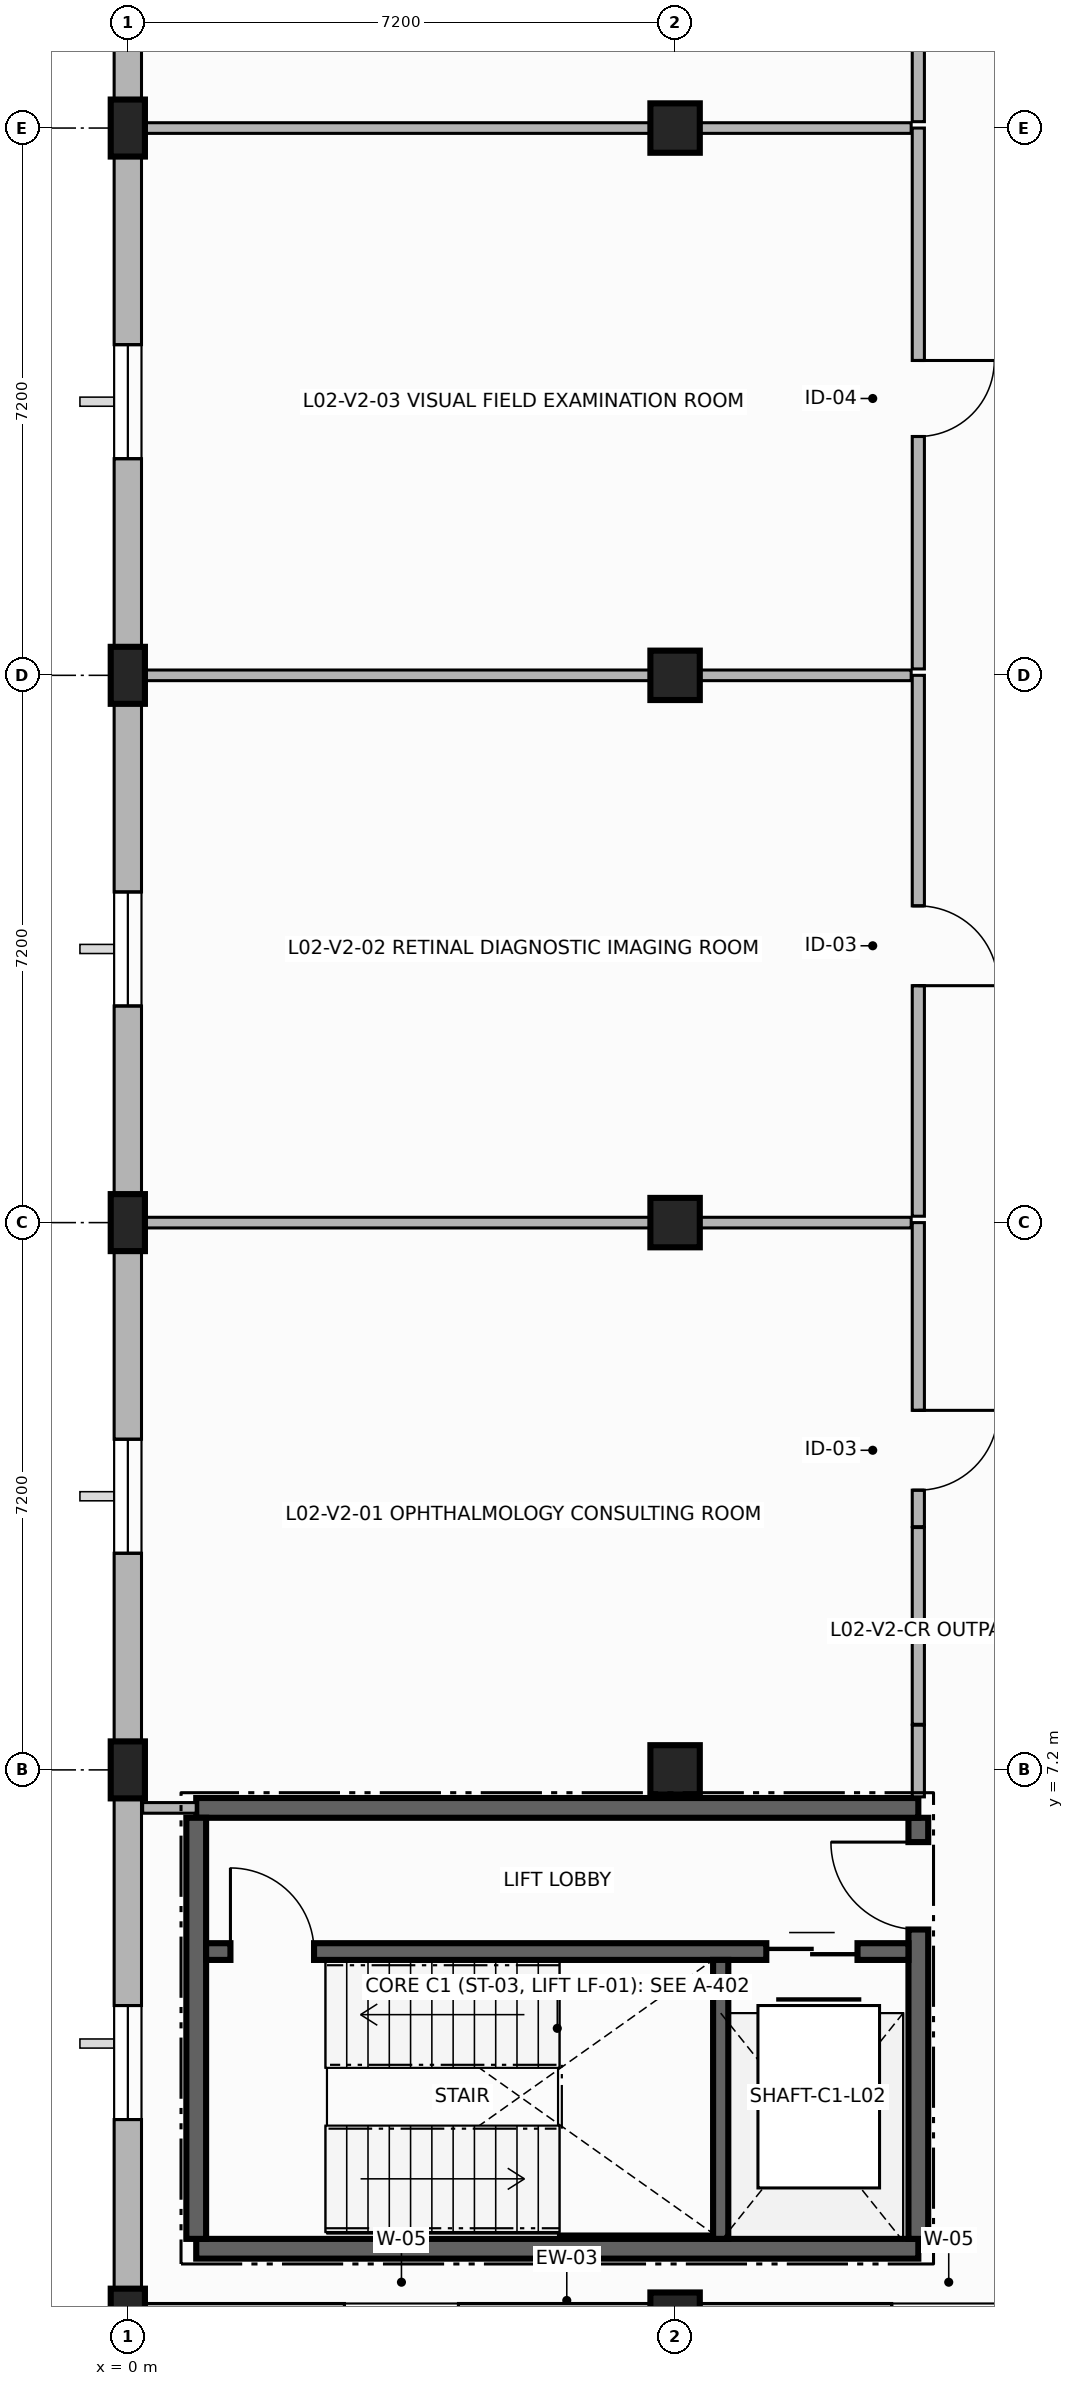
"""IFC4 building model, lengths in metres.
Left out: names, types, materials, properties, quantities, classifications, styles, units other than length and angle.
Written with IfcOpenShell. Run it as: python <this file> out.ifc"""

import sys

from ifc_helpers import new_model, si_unit, direction, frame, frame_2d, origin, origin_with_axes, origin_2d, place, context, subcontext, project, spatial, rectangle, extrude, element, fill, save


model = new_model("IFC4")
c1 = context("Model", 3, precision=1e-05, world=origin(), true_north=direction((0.0, 1.0)))
c2 = subcontext(c1, "Body", "Model", "MODEL_VIEW")
j1 = project(units=[si_unit("LENGTHUNIT", "METRE"), si_unit("PLANEANGLEUNIT", "RADIAN")], contexts=[c1])
p1 = place(None, origin())
s1 = spatial("IfcSite", under=j1, at=p1, CompositionType="ELEMENT")
p2 = place(p1, origin())
s2 = spatial("IfcBuilding", under=s1, at=p2, CompositionType="ELEMENT")
p3 = place(p2, frame((0.0, 0.0, 8.4)))
s3 = spatial("IfcBuildingStorey", under=s2, at=p3, CompositionType="ELEMENT", Elevation=8.4)
for number, where, z_axis, x_axis in (
    (1, (0.0, 0.0, 0.0), (0.0, 0.0, 1.0), (1.0, 0.0, 0.0)),
    (2, (0.0, 7.2, 0.0), (0.0, 0.0, 1.0), (1.0, 0.0, 0.0)),
    (3, (0.0, 14.4, 0.0), (0.0, 0.0, 1.0), (1.0, 0.0, 0.0)),
    (4, (0.0, 21.6, 0.0), (0.0, 0.0, 1.0), (1.0, 0.0, 0.0)),
    (5, (0.0, 28.8, 0.0), (0.0, 0.0, 1.0), (1.0, 0.0, 0.0)),
):
    element("IfcColumn", number, at=place(p3, frame(where, z_axis=z_axis, x_axis=x_axis)), inside=s3, PredefinedType="PILASTER", context=c2, shape_type="SweptSolid", body=[
        extrude(rectangle(XDim=0.45, YDim=0.75, at=origin_2d()), origin(), (0.0, 0.0, 1.0), 3.62),
    ])
for number, where, z_axis, x_axis in (
    (6, (7.2, 0.0, 0.0), (0.0, 0.0, 1.0), (1.0, 0.0, 0.0)),
    (7, (7.2, 7.2, 0.0), (0.0, 0.0, 1.0), (1.0, 0.0, 0.0)),
    (8, (7.2, 14.4, 0.0), (0.0, 0.0, 1.0), (1.0, 0.0, 0.0)),
    (9, (7.2, 21.6, 0.0), (0.0, 0.0, 1.0), (1.0, 0.0, 0.0)),
    (10, (7.2, 28.8, 0.0), (0.0, 0.0, 1.0), (1.0, 0.0, 0.0)),
):
    element("IfcColumn", number, at=place(p3, frame(where, z_axis=z_axis, x_axis=x_axis)), inside=s3, PredefinedType="COLUMN", context=c2, shape_type="SweptSolid", body=[
        extrude(rectangle(XDim=0.65, YDim=0.65, at=origin_2d()), origin(), (0.0, 0.0, 1.0), 3.62),
    ])
p4 = place(p3, origin_with_axes())
e11 = element("IfcWall", 11, at=p4, inside=s3, PredefinedType="SOLIDWALL", context=c2, shape_type="SweptSolid", body=[
    extrude(rectangle(XDim=7.2, YDim=0.36, at=frame_2d((3.6, 0.0))), origin(), (0.0, 0.0, 1.0), 3.0),
])
p5 = place(p4, frame((2.85, 0.0, 0.85)))
e12 = element("IfcOpeningElement", 12, at=p5, cuts=e11, PredefinedType="OPENING", context=c2, shape_type="SweptSolid", body=[
    extrude(rectangle(XDim=1.5, YDim=1.9, at=frame_2d((0.75, 0.95))), frame((0.0, 0.19, 0.0), z_axis=(0.0, -1.0, 0.0), x_axis=(1.0, 0.0, 0.0)), (0.0, 0.0, 1.0), 0.38),
])
p6 = place(p3, frame((7.2, 0.0, 0.0), z_axis=(0.0, 0.0, 1.0), x_axis=(1.0, 0.0, 0.0)))
e13 = element("IfcWall", 13, at=p6, inside=s3, PredefinedType="SOLIDWALL", context=c2, shape_type="SweptSolid", body=[
    extrude(rectangle(XDim=7.2, YDim=0.36, at=frame_2d((3.6, 0.0))), origin(), (0.0, 0.0, 1.0), 3.0),
])
p7 = place(p6, frame((2.85, 0.0, 0.85)))
e14 = element("IfcOpeningElement", 14, at=p7, cuts=e13, PredefinedType="OPENING", context=c2, shape_type="SweptSolid", body=[
    extrude(rectangle(XDim=1.5, YDim=1.9, at=frame_2d((0.75, 0.95))), frame((0.0, 0.19, 0.0), z_axis=(0.0, -1.0, 0.0), x_axis=(1.0, 0.0, 0.0)), (0.0, 0.0, 1.0), 0.38),
])
p8 = place(p3, frame((0.0, 36.0, 0.0), z_axis=(0.0, 0.0, 1.0), x_axis=(0.0, -1.0, 0.0)))
e15 = element("IfcWall", 15, at=p8, inside=s3, PredefinedType="SOLIDWALL", context=c2, shape_type="SweptSolid", body=[
    extrude(rectangle(XDim=7.2, YDim=0.36, at=frame_2d((3.6, 0.0))), origin(), (0.0, 0.0, 1.0), 3.0),
])
p9 = place(p8, frame((2.85, 0.0, 0.85)))
e16 = element("IfcOpeningElement", 16, at=p9, cuts=e15, PredefinedType="OPENING", context=c2, shape_type="SweptSolid", body=[
    extrude(rectangle(XDim=1.5, YDim=1.9, at=frame_2d((0.75, 0.95))), frame((0.0, 0.19, 0.0), z_axis=(0.0, -1.0, 0.0), x_axis=(1.0, 0.0, 0.0)), (0.0, 0.0, 1.0), 0.38),
])
p10 = place(p3, frame((0.0, 28.8, 0.0), z_axis=(0.0, 0.0, 1.0), x_axis=(0.0, -1.0, 0.0)))
e17 = element("IfcWall", 17, at=p10, inside=s3, PredefinedType="SOLIDWALL", context=c2, shape_type="SweptSolid", body=[
    extrude(rectangle(XDim=7.2, YDim=0.36, at=frame_2d((3.6, 0.0))), origin(), (0.0, 0.0, 1.0), 3.0),
])
p11 = place(p10, frame((2.85, 0.0, 0.85)))
e18 = element("IfcOpeningElement", 18, at=p11, cuts=e17, PredefinedType="OPENING", context=c2, shape_type="SweptSolid", body=[
    extrude(rectangle(XDim=1.5, YDim=1.9, at=frame_2d((0.75, 0.95))), frame((0.0, 0.19, 0.0), z_axis=(0.0, -1.0, 0.0), x_axis=(1.0, 0.0, 0.0)), (0.0, 0.0, 1.0), 0.38),
])
p12 = place(p3, frame((0.0, 21.6, 0.0), z_axis=(0.0, 0.0, 1.0), x_axis=(0.0, -1.0, 0.0)))
e19 = element("IfcWall", 19, at=p12, inside=s3, PredefinedType="SOLIDWALL", context=c2, shape_type="SweptSolid", body=[
    extrude(rectangle(XDim=7.2, YDim=0.36, at=frame_2d((3.6, 0.0))), origin(), (0.0, 0.0, 1.0), 3.0),
])
p13 = place(p12, frame((2.85, 0.0, 0.85)))
e20 = element("IfcOpeningElement", 20, at=p13, cuts=e19, PredefinedType="OPENING", context=c2, shape_type="SweptSolid", body=[
    extrude(rectangle(XDim=1.5, YDim=1.9, at=frame_2d((0.75, 0.95))), frame((0.0, 0.19, 0.0), z_axis=(0.0, -1.0, 0.0), x_axis=(1.0, 0.0, 0.0)), (0.0, 0.0, 1.0), 0.38),
])
p14 = place(p3, frame((0.0, 14.4, 0.0), z_axis=(0.0, 0.0, 1.0), x_axis=(0.0, -1.0, 0.0)))
e21 = element("IfcWall", 21, at=p14, inside=s3, PredefinedType="SOLIDWALL", context=c2, shape_type="SweptSolid", body=[
    extrude(rectangle(XDim=7.2, YDim=0.36, at=frame_2d((3.6, 0.0))), origin(), (0.0, 0.0, 1.0), 3.0),
])
p15 = place(p14, frame((2.85, 0.0, 0.85)))
e22 = element("IfcOpeningElement", 22, at=p15, cuts=e21, PredefinedType="OPENING", context=c2, shape_type="SweptSolid", body=[
    extrude(rectangle(XDim=1.5, YDim=1.9, at=frame_2d((0.75, 0.95))), frame((0.0, 0.19, 0.0), z_axis=(0.0, -1.0, 0.0), x_axis=(1.0, 0.0, 0.0)), (0.0, 0.0, 1.0), 0.38),
])
p16 = place(p3, frame((0.0, 7.2, 0.0), z_axis=(0.0, 0.0, 1.0), x_axis=(0.0, -1.0, 0.0)))
e23 = element("IfcWall", 23, at=p16, inside=s3, PredefinedType="SOLIDWALL", context=c2, shape_type="SweptSolid", body=[
    extrude(rectangle(XDim=7.2, YDim=0.36, at=frame_2d((3.6, 0.0))), origin(), (0.0, 0.0, 1.0), 3.0),
])
p17 = place(p16, frame((3.1, 0.0, 0.85)))
e24 = element("IfcOpeningElement", 24, at=p17, cuts=e23, PredefinedType="OPENING", context=c2, shape_type="SweptSolid", body=[
    extrude(rectangle(XDim=1.5, YDim=1.9, at=frame_2d((0.75, 0.95))), frame((0.0, 0.19, 0.0), z_axis=(0.0, -1.0, 0.0), x_axis=(1.0, 0.0, 0.0)), (0.0, 0.0, 1.0), 0.38),
])
p18 = place(p3, frame((0.9, 0.9, 0.0), z_axis=(0.0, 0.0, 1.0), x_axis=(1.0, 0.0, 0.0)))
e25 = element("IfcWall", 25, at=p18, inside=s3, PredefinedType="SHEAR", context=c2, shape_type="SweptSolid", body=[
    extrude(rectangle(XDim=9.5, YDim=0.26, at=frame_2d((4.75, 0.0))), origin(), (0.0, 0.0, 1.0), 3.62),
])
p19 = place(p3, frame((10.4, 1.03, 0.0), z_axis=(0.0, 0.0, 1.0), x_axis=(0.0, 1.0, 0.0)))
e26 = element("IfcWall", 26, at=p19, inside=s3, PredefinedType="SHEAR", context=c2, shape_type="SweptSolid", body=[
    extrude(rectangle(XDim=5.54, YDim=0.26, at=frame_2d((2.77, 0.0))), origin(), (0.0, 0.0, 1.0), 3.62),
])
p20 = place(p19, frame((4.07, 0.0, 0.0)))
e27 = element("IfcOpeningElement", 27, at=p20, cuts=e26, PredefinedType="OPENING", context=c2, shape_type="SweptSolid", body=[
    extrude(rectangle(XDim=1.15, YDim=2.2, at=frame_2d((0.575, 1.1))), frame((0.0, 0.14, 0.0), z_axis=(0.0, -1.0, 0.0), x_axis=(1.0, 0.0, 0.0)), (0.0, 0.0, 1.0), 0.28),
])
p21 = place(p3, frame((10.4, 6.7, 0.0), z_axis=(0.0, 0.0, 1.0), x_axis=(-1.0, 0.0, 0.0)))
e28 = element("IfcWall", 28, at=p21, inside=s3, PredefinedType="SHEAR", context=c2, shape_type="SweptSolid", body=[
    extrude(rectangle(XDim=9.5, YDim=0.26, at=frame_2d((4.75, 0.0))), origin(), (0.0, 0.0, 1.0), 3.62),
])
p22 = place(p3, frame((0.9, 6.57, 0.0), z_axis=(0.0, 0.0, 1.0), x_axis=(0.0, -1.0, 0.0)))
e29 = element("IfcWall", 29, at=p22, inside=s3, PredefinedType="SHEAR", context=c2, shape_type="SweptSolid", body=[
    extrude(rectangle(XDim=5.54, YDim=0.26, at=frame_2d((2.77, 0.0))), origin(), (0.0, 0.0, 1.0), 3.62),
])
p23 = place(p3, frame((1.03, 4.81, 0.0), z_axis=(0.0, 0.0, 1.0), x_axis=(1.0, 0.0, 0.0)))
e30 = element("IfcWall", 30, at=p23, inside=s3, PredefinedType="SHEAR", context=c2, shape_type="SweptSolid", body=[
    extrude(rectangle(XDim=9.24, YDim=0.22, at=frame_2d((4.62, 0.0))), origin(), (0.0, 0.0, 1.0), 3.62),
])
p24 = place(p23, frame((0.32, 0.0, 0.0)))
e31 = element("IfcOpeningElement", 31, at=p24, cuts=e30, PredefinedType="OPENING", context=c2, shape_type="SweptSolid", body=[
    extrude(rectangle(XDim=1.1, YDim=2.15, at=frame_2d((0.55, 1.075))), frame((0.0, 0.12, 0.0), z_axis=(0.0, -1.0, 0.0), x_axis=(1.0, 0.0, 0.0)), (0.0, 0.0, 1.0), 0.24),
])
p25 = place(p23, frame((7.37, 0.0, 0.0)))
e32 = element("IfcOpeningElement", 32, at=p25, cuts=e30, PredefinedType="OPENING", context=c2, shape_type="SweptSolid", body=[
    extrude(rectangle(XDim=1.2, YDim=2.2, at=frame_2d((0.6, 1.1))), frame((0.0, 0.12, 0.0), z_axis=(0.0, -1.0, 0.0), x_axis=(1.0, 0.0, 0.0)), (0.0, 0.0, 1.0), 0.24),
])
p26 = place(p3, frame((7.8, 1.03, 0.0), z_axis=(0.0, 0.0, 1.0), x_axis=(0.0, 1.0, 0.0)))
e33 = element("IfcWall", 33, at=p26, inside=s3, PredefinedType="SHEAR", context=c2, shape_type="SweptSolid", body=[
    extrude(rectangle(XDim=3.67, YDim=0.2, at=frame_2d((1.835, 0.0))), origin(), (0.0, 0.0, 1.0), 3.62),
])
p27 = place(p3, frame((10.4, 14.4, 0.0), z_axis=(0.0, 0.0, 1.0), x_axis=(0.0, -1.0, 0.0)))
e34 = element("IfcWall", 34, at=p27, inside=s3, PredefinedType="PARTITIONING", context=c2, shape_type="SweptSolid", body=[
    extrude(rectangle(XDim=4.0, YDim=0.16, at=frame_2d((2.0, 0.0))), origin(), (0.0, 0.0, 1.0), 2.98),
])
p28 = place(p27, frame((2.47, 0.0, 0.0)))
e35 = element("IfcOpeningElement", 35, at=p28, cuts=e34, PredefinedType="OPENING", context=c2, shape_type="SweptSolid", body=[
    extrude(rectangle(XDim=1.05, YDim=2.15, at=frame_2d((0.525, 1.075))), frame((0.0, 0.09, 0.0), z_axis=(0.0, -1.0, 0.0), x_axis=(1.0, 0.0, 0.0)), (0.0, 0.0, 1.0), 0.18),
])
p29 = place(p3, frame((10.4, 10.388, 0.0), z_axis=(0.0, 0.0, 1.0), x_axis=(0.0, -1.0, 0.0)))
e36 = element("IfcWall", 36, at=p29, inside=s3, PredefinedType="PARTITIONING", context=c2, shape_type="SweptSolid", body=[
    extrude(rectangle(XDim=2.588, YDim=0.16, at=frame_2d((1.294, 0.0))), origin(), (0.0, 0.0, 1.0), 2.98),
])
p30 = place(p3, frame((10.4, 7.788, 0.0), z_axis=(0.0, 0.0, 1.0), x_axis=(0.0, -1.0, 0.0)))
e37 = element("IfcWall", 37, at=p30, inside=s3, PredefinedType="PARTITIONING", context=c2, shape_type="SweptSolid", body=[
    extrude(rectangle(XDim=0.943, YDim=0.16, at=frame_2d((0.472, 0.0))), origin(), (0.0, 0.0, 1.0), 2.98),
])
p31 = place(p3, frame((0.9, 6.7, 0.0), z_axis=(0.0, 0.0, 1.0), x_axis=(-1.0, 0.0, 0.0)))
e38 = element("IfcWall", 38, at=p31, inside=s3, PredefinedType="PARTITIONING", context=c2, shape_type="SweptSolid", body=[
    extrude(rectangle(XDim=0.705, YDim=0.14, at=frame_2d((0.353, 0.0))), origin(), (0.0, 0.0, 1.0), 2.98),
])
p32 = place(p3, frame((0.195, 14.4, 0.0), z_axis=(0.0, 0.0, 1.0), x_axis=(1.0, 0.0, 0.0)))
e39 = element("IfcWall", 39, at=p32, inside=s3, PredefinedType="PARTITIONING", context=c2, shape_type="SweptSolid", body=[
    extrude(rectangle(XDim=10.111, YDim=0.14, at=frame_2d((5.055, 0.0))), origin(), (0.0, 0.0, 1.0), 2.98),
])
p33 = place(p3, frame((10.4, 21.6, 0.0), z_axis=(0.0, 0.0, 1.0), x_axis=(0.0, -1.0, 0.0)))
e40 = element("IfcWall", 40, at=p33, inside=s3, PredefinedType="PARTITIONING", context=c2, shape_type="SweptSolid", body=[
    extrude(rectangle(XDim=7.116, YDim=0.16, at=frame_2d((3.558, 0.0))), origin(), (0.0, 0.0, 1.0), 2.98),
])
p34 = place(p33, frame((3.033, 0.0, 0.0)))
e41 = element("IfcOpeningElement", 41, at=p34, cuts=e40, PredefinedType="OPENING", context=c2, shape_type="SweptSolid", body=[
    extrude(rectangle(XDim=1.05, YDim=2.15, at=frame_2d((0.525, 1.075))), frame((0.0, 0.09, 0.0), z_axis=(0.0, -1.0, 0.0), x_axis=(1.0, 0.0, 0.0)), (0.0, 0.0, 1.0), 0.18),
])
p35 = place(p3, frame((0.195, 21.6, 0.0), z_axis=(0.0, 0.0, 1.0), x_axis=(1.0, 0.0, 0.0)))
e42 = element("IfcWall", 42, at=p35, inside=s3, PredefinedType="PARTITIONING", context=c2, shape_type="SweptSolid", body=[
    extrude(rectangle(XDim=10.111, YDim=0.14, at=frame_2d((5.055, 0.0))), origin(), (0.0, 0.0, 1.0), 2.98),
])
p36 = place(p3, frame((10.4, 28.8, 0.0), z_axis=(0.0, 0.0, 1.0), x_axis=(0.0, -1.0, 0.0)))
e43 = element("IfcWall", 43, at=p36, inside=s3, PredefinedType="PARTITIONING", context=c2, shape_type="SweptSolid", body=[
    extrude(rectangle(XDim=7.116, YDim=0.16, at=frame_2d((3.558, 0.0))), origin(), (0.0, 0.0, 1.0), 2.98),
])
p37 = place(p36, frame((3.058, 0.0, 0.0)))
e44 = element("IfcOpeningElement", 44, at=p37, cuts=e43, PredefinedType="OPENING", context=c2, shape_type="SweptSolid", body=[
    extrude(rectangle(XDim=1.0, YDim=2.15, at=frame_2d((0.5, 1.075))), frame((0.0, 0.09, 0.0), z_axis=(0.0, -1.0, 0.0), x_axis=(1.0, 0.0, 0.0)), (0.0, 0.0, 1.0), 0.18),
])
p38 = place(p3, frame((0.195, 28.8, 0.0), z_axis=(0.0, 0.0, 1.0), x_axis=(1.0, 0.0, 0.0)))
e45 = element("IfcWall", 45, at=p38, inside=s3, PredefinedType="PARTITIONING", context=c2, shape_type="SweptSolid", body=[
    extrude(rectangle(XDim=10.111, YDim=0.14, at=frame_2d((5.055, 0.0))), origin(), (0.0, 0.0, 1.0), 2.98),
])
p39 = place(p3, frame((10.4, 36.655, 0.0), z_axis=(0.0, 0.0, 1.0), x_axis=(0.0, -1.0, 0.0)))
e46 = element("IfcWall", 46, at=p39, inside=s3, PredefinedType="PARTITIONING", context=c2, shape_type="SweptSolid", body=[
    extrude(rectangle(XDim=7.771, YDim=0.16, at=frame_2d((3.885, 0.0))), origin(), (0.0, 0.0, 1.0), 2.98),
])
p40 = place(p39, frame((3.538, 0.0, 0.0)))
e47 = element("IfcOpeningElement", 47, at=p40, cuts=e46, PredefinedType="OPENING", context=c2, shape_type="SweptSolid", body=[
    extrude(rectangle(XDim=1.4, YDim=2.3, at=frame_2d((0.7, 1.15))), frame((0.0, 0.09, 0.0), z_axis=(0.0, -1.0, 0.0), x_axis=(1.0, 0.0, 0.0)), (0.0, 0.0, 1.0), 0.18),
])
p41 = place(p11, origin())
e48 = element("IfcWindow", 48, at=p41, inside=s3, PartitioningType="SINGLE_PANEL", PredefinedType="WINDOW", context=c2, shape_type="SweptSolid", body=[
    extrude(rectangle(XDim=1.5, YDim=1.9, at=frame_2d((0.75, 0.95))), frame((0.0, 0.03, 0.0), z_axis=(0.0, -1.0, 0.0), x_axis=(1.0, 0.0, 0.0)), (0.0, 0.0, 1.0), 0.06),
])
fill(e18, e48)
p42 = place(p13, origin())
e49 = element("IfcWindow", 49, at=p42, inside=s3, PartitioningType="SINGLE_PANEL", PredefinedType="WINDOW", context=c2, shape_type="SweptSolid", body=[
    extrude(rectangle(XDim=1.5, YDim=1.9, at=frame_2d((0.75, 0.95))), frame((0.0, 0.03, 0.0), z_axis=(0.0, -1.0, 0.0), x_axis=(1.0, 0.0, 0.0)), (0.0, 0.0, 1.0), 0.06),
])
fill(e20, e49)
p43 = place(p15, origin())
e50 = element("IfcWindow", 50, at=p43, inside=s3, PartitioningType="SINGLE_PANEL", PredefinedType="WINDOW", context=c2, shape_type="SweptSolid", body=[
    extrude(rectangle(XDim=1.5, YDim=1.9, at=frame_2d((0.75, 0.95))), frame((0.0, 0.03, 0.0), z_axis=(0.0, -1.0, 0.0), x_axis=(1.0, 0.0, 0.0)), (0.0, 0.0, 1.0), 0.06),
])
fill(e22, e50)
p44 = place(p17, origin())
e51 = element("IfcWindow", 51, at=p44, inside=s3, PartitioningType="SINGLE_PANEL", PredefinedType="WINDOW", context=c2, shape_type="SweptSolid", body=[
    extrude(rectangle(XDim=1.5, YDim=1.9, at=frame_2d((0.75, 0.95))), frame((0.0, 0.03, 0.0), z_axis=(0.0, -1.0, 0.0), x_axis=(1.0, 0.0, 0.0)), (0.0, 0.0, 1.0), 0.06),
])
fill(e24, e51)
p45 = place(p24, origin())
e52 = element("IfcDoor", 52, at=p45, inside=s3, OperationType="SINGLE_SWING_LEFT", PredefinedType="DOOR", context=c2, shape_type="SweptSolid", body=[
    extrude(rectangle(XDim=1.1, YDim=2.15, at=frame_2d((0.55, 1.075))), frame((0.0, 0.025, 0.0), z_axis=(0.0, -1.0, 0.0), x_axis=(1.0, 0.0, 0.0)), (0.0, 0.0, 1.0), 0.05),
])
fill(e31, e52)
p46 = place(p25, origin())
e53 = element("IfcDoor", 53, at=p46, inside=s3, OperationType="DOUBLE_DOOR_SLIDING", PredefinedType="DOOR", context=c2, shape_type="SweptSolid", body=[
    extrude(rectangle(XDim=1.2, YDim=2.2, at=frame_2d((0.6, 1.1))), frame((0.0, 0.025, 0.0), z_axis=(0.0, -1.0, 0.0), x_axis=(1.0, 0.0, 0.0)), (0.0, 0.0, 1.0), 0.05),
])
fill(e32, e53)
p47 = place(p20, origin())
e54 = element("IfcDoor", 54, at=p47, inside=s3, OperationType="SINGLE_SWING_RIGHT", PredefinedType="DOOR", context=c2, shape_type="SweptSolid", body=[
    extrude(rectangle(XDim=1.15, YDim=2.2, at=frame_2d((0.575, 1.1))), frame((0.0, 0.025, 0.0), z_axis=(0.0, -1.0, 0.0), x_axis=(1.0, 0.0, 0.0)), (0.0, 0.0, 1.0), 0.05),
])
fill(e27, e54)
p48 = place(p28, origin())
e55 = element("IfcDoor", 55, at=p48, inside=s3, OperationType="SINGLE_SWING_LEFT", PredefinedType="DOOR", context=c2, shape_type="SweptSolid", body=[
    extrude(rectangle(XDim=1.05, YDim=2.15, at=frame_2d((0.525, 1.075))), frame((0.0, 0.025, 0.0), z_axis=(0.0, -1.0, 0.0), x_axis=(1.0, 0.0, 0.0)), (0.0, 0.0, 1.0), 0.05),
])
fill(e35, e55)
p49 = place(p34, origin())
e56 = element("IfcDoor", 56, at=p49, inside=s3, OperationType="SINGLE_SWING_RIGHT", PredefinedType="DOOR", context=c2, shape_type="SweptSolid", body=[
    extrude(rectangle(XDim=1.05, YDim=2.15, at=frame_2d((0.525, 1.075))), frame((0.0, 0.025, 0.0), z_axis=(0.0, -1.0, 0.0), x_axis=(1.0, 0.0, 0.0)), (0.0, 0.0, 1.0), 0.05),
])
fill(e41, e56)
p50 = place(p37, origin())
e57 = element("IfcDoor", 57, at=p50, inside=s3, OperationType="SINGLE_SWING_LEFT", PredefinedType="DOOR", context=c2, shape_type="SweptSolid", body=[
    extrude(rectangle(XDim=1.0, YDim=2.15, at=frame_2d((0.5, 1.075))), frame((0.0, 0.025, 0.0), z_axis=(0.0, -1.0, 0.0), x_axis=(1.0, 0.0, 0.0)), (0.0, 0.0, 1.0), 0.05),
])
fill(e44, e57)
save(model, sys.argv[1])
